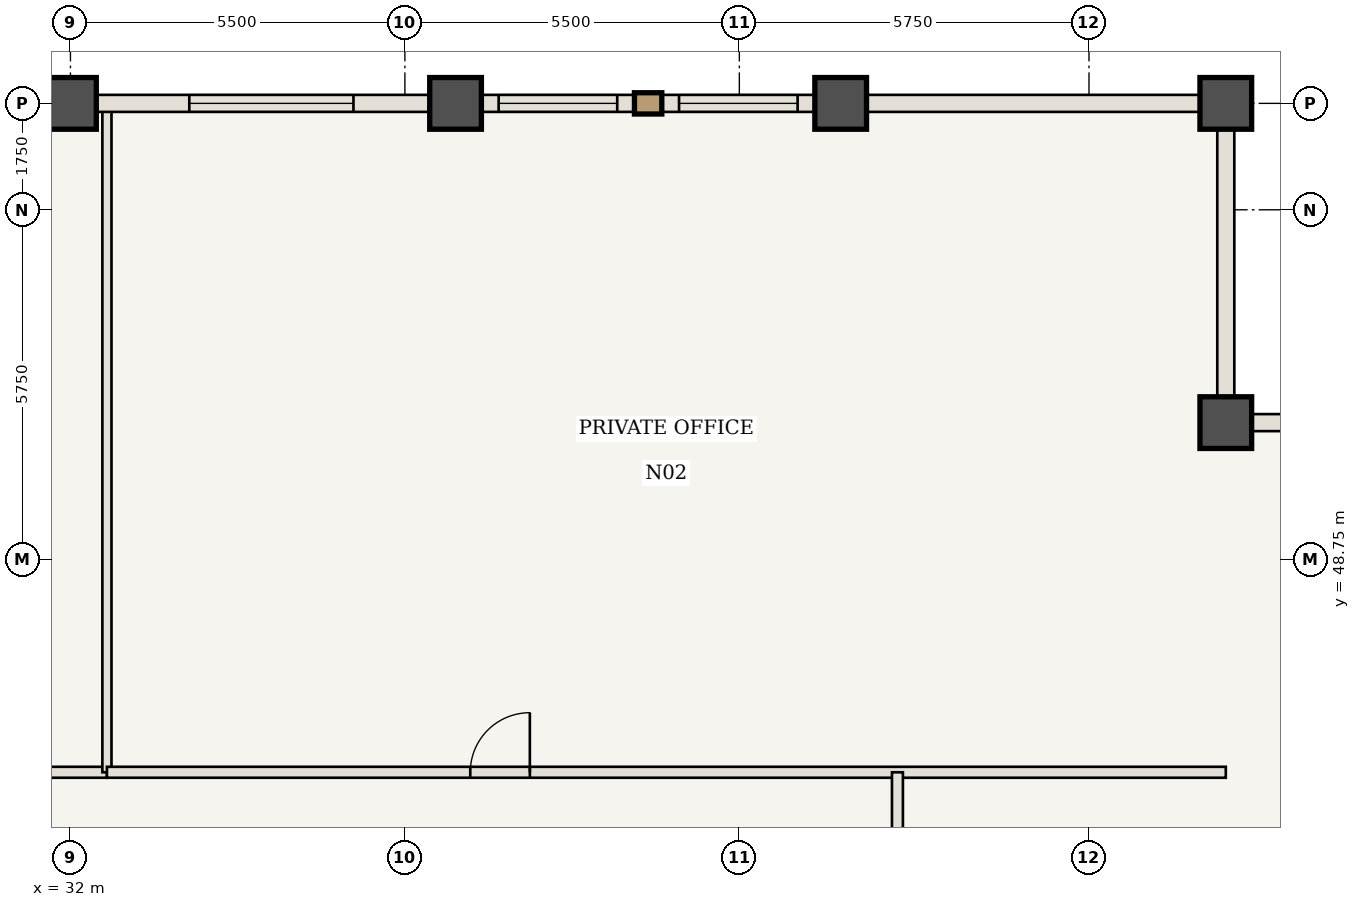
"""IFC4 building model, lengths in metres.
Left out: names, types, materials, properties, quantities, classifications, styles, units other than length and angle.
Written with IfcOpenShell. Run it as: python <this file> out.ifc"""

import sys

from ifc_helpers import new_model, si_unit, direction, frame, frame_2d, origin, origin_2d, place, context, subcontext, project, spatial, rectangle, extrude, element, fill, save


model = new_model("IFC4")
c1 = context("Model", 3, precision=1e-05, world=origin(), true_north=direction((0.0, 1.0)))
c2 = subcontext(c1, "Body", "Model", "MODEL_VIEW")
j1 = project(units=[si_unit("LENGTHUNIT", "METRE"), si_unit("PLANEANGLEUNIT", "RADIAN")], contexts=[c1])
p1 = place(None, origin())
s1 = spatial("IfcSite", under=j1, at=p1, CompositionType="ELEMENT")
p2 = place(p1, origin())
s2 = spatial("IfcBuilding", under=s1, at=p2, CompositionType="ELEMENT")
p3 = place(p2, frame((0.0, 0.0, 236.95)))
s3 = spatial("IfcBuildingStorey", under=s2, at=p3, CompositionType="ELEMENT", Elevation=236.95)
for number, where, z_axis, x_axis in (
    (1, (51.0, 51.0, 0.0), (0.0, 0.0, 1.0), (1.0, 0.0, 0.0)),
    (2, (51.0, 56.25, 0.0), (0.0, 0.0, 1.0), (1.0, 0.0, 0.0)),
    (3, (32.0, 56.25, 0.0), (0.0, 0.0, 1.0), (1.0, 0.0, 0.0)),
    (4, (38.333, 56.25, 0.0), (0.0, 0.0, 1.0), (1.0, 0.0, 0.0)),
    (5, (44.667, 56.25, 0.0), (0.0, 0.0, 1.0), (1.0, 0.0, 0.0)),
):
    element("IfcColumn", number, at=place(p3, frame(where, z_axis=z_axis, x_axis=x_axis)), inside=s3, PredefinedType="COLUMN", context=c2, shape_type="SweptSolid", body=[
        extrude(rectangle(XDim=0.85, YDim=0.85, at=origin_2d()), origin(), (0.0, 0.0, 1.0), 3.85),
    ])
p4 = place(p3, frame((13.0, 45.25, 0.0), z_axis=(0.0, 0.0, 1.0), x_axis=(1.0, 0.0, 0.0)))
e6 = element("IfcWall", 6, at=p4, inside=s3, PredefinedType="STANDARD", context=c2, shape_type="SweptSolid", body=[
    extrude(rectangle(XDim=19.6, YDim=0.18, at=frame_2d((9.8, 0.0))), origin(), (0.0, 0.0, 1.0), 3.685),
])
p5 = place(p4, frame((12.175, 0.0, 0.0)))
e7 = element("IfcOpeningElement", 7, at=p5, cuts=e6, PredefinedType="OPENING", context=c2, shape_type="SweptSolid", body=[
    extrude(rectangle(XDim=0.98, YDim=2.2, at=frame_2d((0.49, 1.1))), frame((0.0, 0.1, 0.0), z_axis=(0.0, -1.0, 0.0), x_axis=(1.0, 0.0, 0.0)), (0.0, 0.0, 1.0), 0.2),
])
p6 = place(p3, frame((32.6, 45.25, 0.0), z_axis=(0.0, 0.0, 1.0), x_axis=(0.0, 1.0, 0.0)))
e8 = element("IfcWall", 8, at=p6, inside=s3, PredefinedType="STANDARD", context=c2, shape_type="SweptSolid", body=[
    extrude(rectangle(XDim=10.94, YDim=0.15, at=frame_2d((5.47, 0.0))), origin(), (0.0, 0.0, 1.0), 3.685),
])
p7 = place(p3, frame((32.6, 45.25, 0.0), z_axis=(0.0, 0.0, 1.0), x_axis=(1.0, 0.0, 0.0)))
e9 = element("IfcWall", 9, at=p7, inside=s3, PredefinedType="STANDARD", context=c2, shape_type="SweptSolid", body=[
    extrude(rectangle(XDim=18.4, YDim=0.18, at=frame_2d((9.2, 0.0))), origin(), (0.0, 0.0, 1.0), 3.685),
])
p8 = place(p7, frame((5.975, 0.0, 0.0)))
e10 = element("IfcOpeningElement", 10, at=p8, cuts=e9, PredefinedType="OPENING", context=c2, shape_type="SweptSolid", body=[
    extrude(rectangle(XDim=0.98, YDim=2.2, at=frame_2d((0.49, 1.1))), frame((0.0, 0.1, 0.0), z_axis=(0.0, -1.0, 0.0), x_axis=(1.0, 0.0, 0.0)), (0.0, 0.0, 1.0), 0.2),
])
p9 = place(p3, frame((45.6, 32.7, 0.0), z_axis=(0.0, 0.0, 1.0), x_axis=(0.0, 1.0, 0.0)))
e11 = element("IfcWall", 11, at=p9, inside=s3, PredefinedType="STANDARD", context=c2, shape_type="SweptSolid", body=[
    extrude(rectangle(XDim=12.55, YDim=0.18, at=frame_2d((6.275, 0.0))), origin(), (0.0, 0.0, 1.0), 3.685),
])
p10 = place(p9, frame((5.775, 0.0, 0.0)))
e12 = element("IfcOpeningElement", 12, at=p10, cuts=e11, PredefinedType="OPENING", context=c2, shape_type="SweptSolid", body=[
    extrude(rectangle(XDim=0.98, YDim=2.2, at=frame_2d((0.49, 1.1))), frame((0.0, 0.1, 0.0), z_axis=(0.0, -1.0, 0.0), x_axis=(1.0, 0.0, 0.0)), (0.0, 0.0, 1.0), 0.2),
])
p11 = place(p3, frame((25.667, 56.25, 0.0), z_axis=(0.0, 0.0, 1.0), x_axis=(1.0, 0.0, 0.0)))
e13 = element("IfcWall", 13, at=p11, inside=s3, PredefinedType="USERDEFINED", context=c2, shape_type="SweptSolid", body=[
    extrude(rectangle(XDim=6.333, YDim=0.28, at=frame_2d((3.167, 0.0))), origin(), (0.0, 0.0, 1.0), 2.985),
])
p12 = place(p11, frame((1.817, 0.0, 0.85)))
e14 = element("IfcOpeningElement", 14, at=p12, cuts=e13, PredefinedType="OPENING", context=c2, shape_type="SweptSolid", body=[
    extrude(rectangle(XDim=2.7, YDim=1.935, at=frame_2d((1.35, 0.968))), frame((0.0, 0.15, 0.0), z_axis=(0.0, -1.0, 0.0), x_axis=(1.0, 0.0, 0.0)), (0.0, 0.0, 1.0), 0.3),
])
p13 = place(p3, frame((32.0, 56.25, 0.0), z_axis=(0.0, 0.0, 1.0), x_axis=(1.0, 0.0, 0.0)))
e15 = element("IfcWall", 15, at=p13, inside=s3, PredefinedType="USERDEFINED", context=c2, shape_type="SweptSolid", body=[
    extrude(rectangle(XDim=6.333, YDim=0.28, at=frame_2d((3.167, 0.0))), origin(), (0.0, 0.0, 1.0), 2.985),
])
p14 = place(p13, frame((1.954, 0.0, 0.85)))
e16 = element("IfcOpeningElement", 16, at=p14, cuts=e15, PredefinedType="OPENING", context=c2, shape_type="SweptSolid", body=[
    extrude(rectangle(XDim=2.7, YDim=1.935, at=frame_2d((1.35, 0.968))), frame((0.0, 0.15, 0.0), z_axis=(0.0, -1.0, 0.0), x_axis=(1.0, 0.0, 0.0)), (0.0, 0.0, 1.0), 0.3),
])
p15 = place(p3, frame((38.333, 56.25, 0.0), z_axis=(0.0, 0.0, 1.0), x_axis=(1.0, 0.0, 0.0)))
e17 = element("IfcWall", 17, at=p15, inside=s3, PredefinedType="USERDEFINED", context=c2, shape_type="SweptSolid", body=[
    extrude(rectangle(XDim=6.333, YDim=0.28, at=frame_2d((3.167, 0.0))), origin(), (0.0, 0.0, 1.0), 2.985),
])
p16 = place(p15, frame((0.708, 0.0, 0.85)))
e18 = element("IfcOpeningElement", 18, at=p16, cuts=e17, PredefinedType="OPENING", context=c2, shape_type="SweptSolid", body=[
    extrude(rectangle(XDim=1.95, YDim=1.935, at=frame_2d((0.975, 0.968))), frame((0.0, 0.15, 0.0), z_axis=(0.0, -1.0, 0.0), x_axis=(1.0, 0.0, 0.0)), (0.0, 0.0, 1.0), 0.3),
])
p17 = place(p15, frame((3.675, 0.0, 0.85)))
e19 = element("IfcOpeningElement", 19, at=p17, cuts=e17, PredefinedType="OPENING", context=c2, shape_type="SweptSolid", body=[
    extrude(rectangle(XDim=1.95, YDim=1.935, at=frame_2d((0.975, 0.968))), frame((0.0, 0.15, 0.0), z_axis=(0.0, -1.0, 0.0), x_axis=(1.0, 0.0, 0.0)), (0.0, 0.0, 1.0), 0.3),
])
p18 = place(p3, frame((44.667, 56.25, 0.0), z_axis=(0.0, 0.0, 1.0), x_axis=(1.0, 0.0, 0.0)))
e20 = element("IfcWall", 20, at=p18, inside=s3, PredefinedType="USERDEFINED", context=c2, shape_type="SweptSolid", body=[
    extrude(rectangle(XDim=6.333, YDim=0.28, at=frame_2d((3.167, 0.0))), origin(), (0.0, 0.0, 1.0), 2.985),
])
for number, where, z_axis, x_axis in (
    (21, (51.0, 51.0, 0.0), (0.0, 0.0, 1.0), (1.0, 0.0, 0.0)),
    (22, (51.0, 56.25, 0.0), (0.0, 0.0, 1.0), (0.0, -1.0, 0.0)),
):
    element("IfcWall", number, at=place(p3, frame(where, z_axis=z_axis, x_axis=x_axis)), inside=s3, PredefinedType="USERDEFINED", context=c2, shape_type="SweptSolid", body=[
        extrude(rectangle(XDim=5.25, YDim=0.28, at=frame_2d((2.625, 0.0))), origin(), (0.0, 0.0, 1.0), 2.985),
    ])
p19 = place(p8, origin())
e23 = element("IfcDoor", 23, at=p19, inside=s3, OperationType="SINGLE_SWING_RIGHT", PredefinedType="DOOR", context=c2, shape_type="SweptSolid", body=[
    extrude(rectangle(XDim=0.98, YDim=2.2, at=frame_2d((0.49, 1.1))), frame((0.0, 0.025, 0.0), z_axis=(0.0, -1.0, 0.0), x_axis=(1.0, 0.0, 0.0)), (0.0, 0.0, 1.0), 0.05),
])
fill(e10, e23)
p20 = place(p14, origin())
e24 = element("IfcWindow", 24, at=p20, inside=s3, PartitioningType="SINGLE_PANEL", PredefinedType="WINDOW", context=c2, shape_type="SweptSolid", body=[
    extrude(rectangle(XDim=2.7, YDim=1.935, at=frame_2d((1.35, 0.968))), frame((0.0, 0.03, 0.0), z_axis=(0.0, -1.0, 0.0), x_axis=(1.0, 0.0, 0.0)), (0.0, 0.0, 1.0), 0.06),
])
fill(e16, e24)
p21 = place(p16, origin())
e25 = element("IfcWindow", 25, at=p21, inside=s3, PartitioningType="SINGLE_PANEL", PredefinedType="WINDOW", context=c2, shape_type="SweptSolid", body=[
    extrude(rectangle(XDim=1.95, YDim=1.935, at=frame_2d((0.975, 0.968))), frame((0.0, 0.03, 0.0), z_axis=(0.0, -1.0, 0.0), x_axis=(1.0, 0.0, 0.0)), (0.0, 0.0, 1.0), 0.06),
])
fill(e18, e25)
p22 = place(p17, origin())
e26 = element("IfcWindow", 26, at=p22, inside=s3, PartitioningType="SINGLE_PANEL", PredefinedType="WINDOW", context=c2, shape_type="SweptSolid", body=[
    extrude(rectangle(XDim=1.95, YDim=1.935, at=frame_2d((0.975, 0.968))), frame((0.0, 0.03, 0.0), z_axis=(0.0, -1.0, 0.0), x_axis=(1.0, 0.0, 0.0)), (0.0, 0.0, 1.0), 0.06),
])
fill(e19, e26)
save(model, sys.argv[1])
